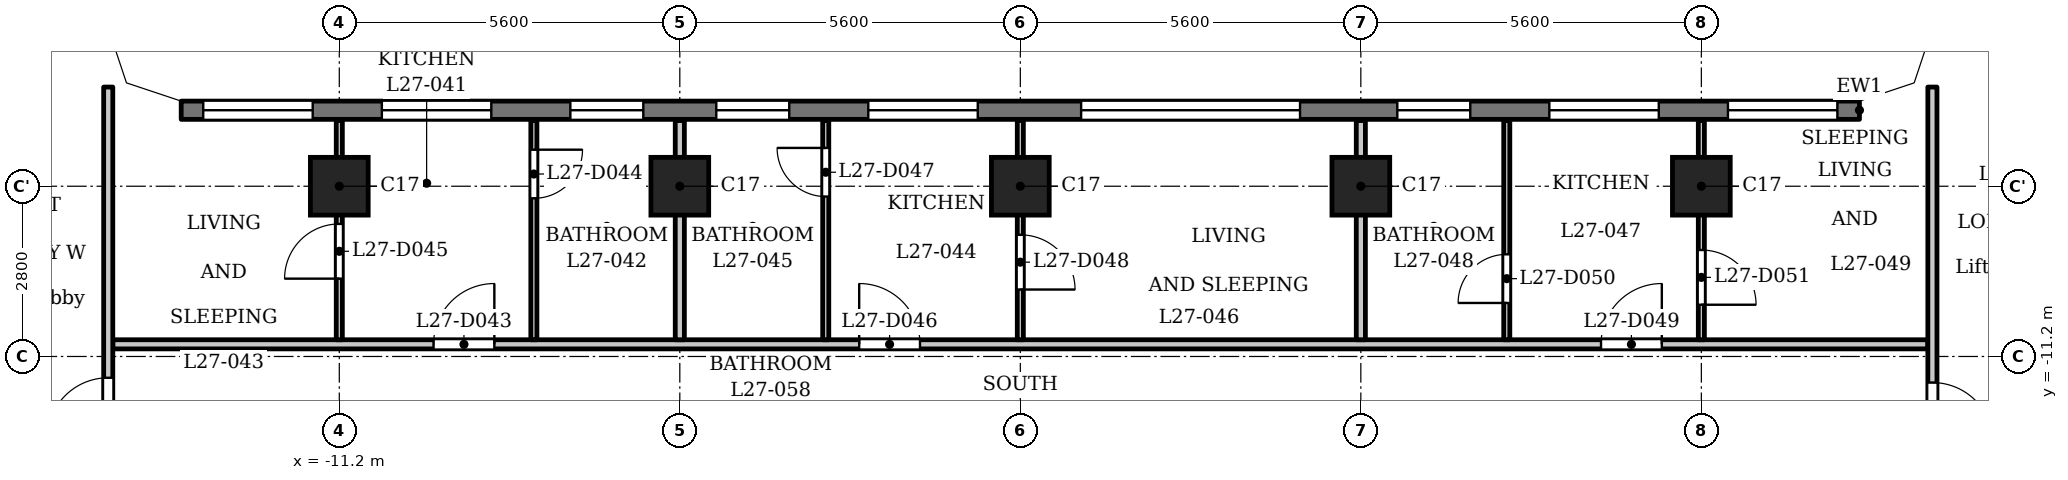
"""IFC4 building model, lengths in metres.
Left out: names, types, materials, properties, quantities, classifications, styles, units other than length and angle.
Written with IfcOpenShell. Run it as: python <this file> out.ifc"""

import sys

from ifc_helpers import new_model, si_unit, direction, frame, frame_2d, origin, origin_2d, place, context, subcontext, project, spatial, polyline, rectangle, outline, extrude, element, fill, save


model = new_model("IFC4")
c1 = context("Model", 3, precision=1e-05, world=origin(), true_north=direction((0.0, 1.0)))
c2 = subcontext(c1, "Body", "Model", "MODEL_VIEW")
j1 = project(units=[si_unit("LENGTHUNIT", "METRE"), si_unit("PLANEANGLEUNIT", "RADIAN")], contexts=[c1])
p1 = place(None, origin())
s1 = spatial("IfcSite", under=j1, at=p1, CompositionType="ELEMENT")
p2 = place(p1, origin())
s2 = spatial("IfcBuilding", under=s1, at=p2, CompositionType="ELEMENT")
p3 = place(p2, frame((0.0, 0.0, 107.8)))
s3 = spatial("IfcBuildingStorey", under=s2, at=p3, CompositionType="ELEMENT", Elevation=107.8)
for number, where, z_axis, x_axis in (
    (1, (-11.2, -8.4, 0.0), (0.0, 0.0, 1.0), (1.0, 0.0, 0.0)),
    (2, (-5.6, -8.4, 0.0), (0.0, 0.0, 1.0), (1.0, 0.0, 0.0)),
    (3, (0.0, -8.4, 0.0), (0.0, 0.0, 1.0), (1.0, 0.0, 0.0)),
    (4, (5.6, -8.4, 0.0), (0.0, 0.0, 1.0), (1.0, 0.0, 0.0)),
    (5, (11.2, -8.4, 0.0), (0.0, 0.0, 1.0), (1.0, 0.0, 0.0)),
):
    element("IfcColumn", number, at=place(p3, frame(where, z_axis=z_axis, x_axis=x_axis)), inside=s3, PredefinedType="COLUMN", context=c2, shape_type="SweptSolid", body=[
        extrude(rectangle(XDim=0.95, YDim=0.95, at=origin_2d()), origin(), (0.0, 0.0, 1.0), 3.5),
    ])
p4 = place(p3, frame((13.8, -7.15, 0.0), z_axis=(0.0, 0.0, 1.0), x_axis=(-1.0, 0.0, 0.0)))
e6 = element("IfcWall", 6, at=p4, inside=s3, PredefinedType="SOLIDWALL", context=c2, shape_type="SweptSolid", body=[
    extrude(rectangle(XDim=27.6, YDim=0.3, at=frame_2d((13.8, 0.0))), origin(), (0.0, 0.0, 1.0), 3.2),
])
p5 = place(p4, frame((0.363, 0.0, 0.9)))
e7 = element("IfcOpeningElement", 7, at=p5, cuts=e6, PredefinedType="OPENING", context=c2, shape_type="SweptSolid", body=[
    extrude(rectangle(XDim=1.8, YDim=1.25, at=frame_2d((0.9, 0.625))), frame((0.0, 0.16, 0.0), z_axis=(0.0, -1.0, 0.0), x_axis=(1.0, 0.0, 0.0)), (0.0, 0.0, 1.0), 0.32),
])
p6 = place(p4, frame((3.3, 0.0, 0.9)))
e8 = element("IfcOpeningElement", 8, at=p6, cuts=e6, PredefinedType="OPENING", context=c2, shape_type="SweptSolid", body=[
    extrude(rectangle(XDim=1.8, YDim=1.25, at=frame_2d((0.9, 0.625))), frame((0.0, 0.16, 0.0), z_axis=(0.0, -1.0, 0.0), x_axis=(1.0, 0.0, 0.0)), (0.0, 0.0, 1.0), 0.32),
])
p7 = place(p4, frame((6.4, 0.0, 0.6)))
e9 = element("IfcOpeningElement", 9, at=p7, cuts=e6, PredefinedType="OPENING", context=c2, shape_type="SweptSolid", body=[
    extrude(rectangle(XDim=1.2, YDim=1.55, at=frame_2d((0.6, 0.775))), frame((0.0, 0.16, 0.0), z_axis=(0.0, -1.0, 0.0), x_axis=(1.0, 0.0, 0.0)), (0.0, 0.0, 1.0), 0.32),
])
p8 = place(p4, frame((9.2, 0.0, 1.2)))
e10 = element("IfcOpeningElement", 10, at=p8, cuts=e6, PredefinedType="OPENING", context=c2, shape_type="SweptSolid", body=[
    extrude(rectangle(XDim=3.6, YDim=0.95, at=frame_2d((1.8, 0.475))), frame((0.0, 0.16, 0.0), z_axis=(0.0, -1.0, 0.0), x_axis=(1.0, 0.0, 0.0)), (0.0, 0.0, 1.0), 0.32),
])
p9 = place(p4, frame((14.5, 0.0, 0.9)))
e11 = element("IfcOpeningElement", 11, at=p9, cuts=e6, PredefinedType="OPENING", context=c2, shape_type="SweptSolid", body=[
    extrude(rectangle(XDim=1.8, YDim=1.25, at=frame_2d((0.9, 0.625))), frame((0.0, 0.16, 0.0), z_axis=(0.0, -1.0, 0.0), x_axis=(1.0, 0.0, 0.0)), (0.0, 0.0, 1.0), 0.32),
])
p10 = place(p4, frame((17.6, 0.0, 0.6)))
e12 = element("IfcOpeningElement", 12, at=p10, cuts=e6, PredefinedType="OPENING", context=c2, shape_type="SweptSolid", body=[
    extrude(rectangle(XDim=1.2, YDim=1.55, at=frame_2d((0.6, 0.775))), frame((0.0, 0.16, 0.0), z_axis=(0.0, -1.0, 0.0), x_axis=(1.0, 0.0, 0.0)), (0.0, 0.0, 1.0), 0.32),
])
p11 = place(p4, frame((20.0, 0.0, 0.6)))
e13 = element("IfcOpeningElement", 13, at=p11, cuts=e6, PredefinedType="OPENING", context=c2, shape_type="SweptSolid", body=[
    extrude(rectangle(XDim=1.2, YDim=1.55, at=frame_2d((0.6, 0.775))), frame((0.0, 0.16, 0.0), z_axis=(0.0, -1.0, 0.0), x_axis=(1.0, 0.0, 0.0)), (0.0, 0.0, 1.0), 0.32),
])
p12 = place(p4, frame((22.5, 0.0, 0.9)))
e14 = element("IfcOpeningElement", 14, at=p12, cuts=e6, PredefinedType="OPENING", context=c2, shape_type="SweptSolid", body=[
    extrude(rectangle(XDim=1.8, YDim=1.25, at=frame_2d((0.9, 0.625))), frame((0.0, 0.16, 0.0), z_axis=(0.0, -1.0, 0.0), x_axis=(1.0, 0.0, 0.0)), (0.0, 0.0, 1.0), 0.32),
])
p13 = place(p4, frame((25.438, 0.0, 0.9)))
e15 = element("IfcOpeningElement", 15, at=p13, cuts=e6, PredefinedType="OPENING", context=c2, shape_type="SweptSolid", body=[
    extrude(rectangle(XDim=1.8, YDim=1.25, at=frame_2d((0.9, 0.625))), frame((0.0, 0.16, 0.0), z_axis=(0.0, -1.0, 0.0), x_axis=(1.0, 0.0, 0.0)), (0.0, 0.0, 1.0), 0.32),
])
p14 = place(p3, frame((-14.925, -11.0, 0.0), z_axis=(0.0, 0.0, 1.0), x_axis=(1.0, 0.0, 0.0)))
e16 = element("IfcWall", 16, at=p14, inside=s3, PredefinedType="PARTITIONING", context=c2, shape_type="SweptSolid", body=[
    extrude(rectangle(XDim=29.85, YDim=0.15, at=frame_2d((14.925, 0.0))), origin(), (0.0, 0.0, 1.0), 3.2),
])
p15 = place(p14, frame((5.275, 0.0, 0.0)))
e17 = element("IfcOpeningElement", 17, at=p15, cuts=e16, PredefinedType="OPENING", context=c2, shape_type="SweptSolid", body=[
    extrude(rectangle(XDim=1.0, YDim=2.1, at=frame_2d((0.5, 1.05))), frame((0.0, 0.085, 0.0), z_axis=(0.0, -1.0, 0.0), x_axis=(1.0, 0.0, 0.0)), (0.0, 0.0, 1.0), 0.17),
])
p16 = place(p14, frame((12.275, 0.0, 0.0)))
e18 = element("IfcOpeningElement", 18, at=p16, cuts=e16, PredefinedType="OPENING", context=c2, shape_type="SweptSolid", body=[
    extrude(rectangle(XDim=1.0, YDim=2.1, at=frame_2d((0.5, 1.05))), frame((0.0, 0.085, 0.0), z_axis=(0.0, -1.0, 0.0), x_axis=(1.0, 0.0, 0.0)), (0.0, 0.0, 1.0), 0.17),
])
p17 = place(p14, frame((24.475, 0.0, 0.0)))
e19 = element("IfcOpeningElement", 19, at=p17, cuts=e16, PredefinedType="OPENING", context=c2, shape_type="SweptSolid", body=[
    extrude(rectangle(XDim=1.0, YDim=2.1, at=frame_2d((0.5, 1.05))), frame((0.0, 0.085, 0.0), z_axis=(0.0, -1.0, 0.0), x_axis=(1.0, 0.0, 0.0)), (0.0, 0.0, 1.0), 0.17),
])
p18 = place(p3, frame((-15.0, -13.125, 0.0), z_axis=(0.0, 0.0, 1.0), x_axis=(0.0, 1.0, 0.0)))
e20 = element("IfcWall", 20, at=p18, inside=s3, PredefinedType="PARTITIONING", context=c2, shape_type="SweptSolid", body=[
    extrude(rectangle(XDim=6.356, YDim=0.15, at=frame_2d((3.178, 0.0))), origin(), (0.0, 0.0, 1.0), 3.2),
])
p19 = place(p18, frame((0.575, 0.0, 0.0)))
e21 = element("IfcOpeningElement", 21, at=p19, cuts=e20, PredefinedType="OPENING", context=c2, shape_type="SweptSolid", body=[
    extrude(rectangle(XDim=1.0, YDim=2.1, at=frame_2d((0.5, 1.05))), frame((0.0, 0.085, 0.0), z_axis=(0.0, -1.0, 0.0), x_axis=(1.0, 0.0, 0.0)), (0.0, 0.0, 1.0), 0.17),
])
p20 = place(p3, frame((-11.2, -10.925, 0.0), z_axis=(0.0, 0.0, 1.0), x_axis=(0.0, 1.0, 0.0)))
e22 = element("IfcWall", 22, at=p20, inside=s3, PredefinedType="PARTITIONING", context=c2, shape_type="SweptSolid", body=[
    extrude(rectangle(XDim=3.605, YDim=0.1, at=frame_2d((1.802, 0.0))), origin(), (0.0, 0.0, 1.0), 3.2),
])
p21 = place(p20, frame((1.005, 0.0, 0.0)))
e23 = element("IfcOpeningElement", 23, at=p21, cuts=e22, PredefinedType="OPENING", context=c2, shape_type="SweptSolid", body=[
    extrude(rectangle(XDim=0.9, YDim=2.1, at=frame_2d((0.45, 1.05))), frame((0.0, 0.06, 0.0), z_axis=(0.0, -1.0, 0.0), x_axis=(1.0, 0.0, 0.0)), (0.0, 0.0, 1.0), 0.12),
])
p22 = place(p3, frame((-8.0, -10.925, 0.0), z_axis=(0.0, 0.0, 1.0), x_axis=(0.0, 1.0, 0.0)))
e24 = element("IfcWall", 24, at=p22, inside=s3, PredefinedType="PARTITIONING", context=c2, shape_type="SweptSolid", body=[
    extrude(rectangle(XDim=3.605, YDim=0.1, at=frame_2d((1.802, 0.0))), origin(), (0.0, 0.0, 1.0), 3.2),
])
p23 = place(p22, frame((2.326, 0.0, 0.0)))
e25 = element("IfcOpeningElement", 25, at=p23, cuts=e24, PredefinedType="OPENING", context=c2, shape_type="SweptSolid", body=[
    extrude(rectangle(XDim=0.8, YDim=2.1, at=frame_2d((0.4, 1.05))), frame((0.0, 0.06, 0.0), z_axis=(0.0, -1.0, 0.0), x_axis=(1.0, 0.0, 0.0)), (0.0, 0.0, 1.0), 0.12),
])
p24 = place(p3, frame((-5.6, -10.925, 0.0), z_axis=(0.0, 0.0, 1.0), x_axis=(0.0, 1.0, 0.0)))
e26 = element("IfcWall", 26, at=p24, inside=s3, PredefinedType="PARTITIONING", context=c2, shape_type="SweptSolid", body=[
    extrude(rectangle(XDim=3.605, YDim=0.15, at=frame_2d((1.802, 0.0))), origin(), (0.0, 0.0, 1.0), 3.2),
])
p25 = place(p3, frame((-3.2, -10.925, 0.0), z_axis=(0.0, 0.0, 1.0), x_axis=(0.0, 1.0, 0.0)))
e27 = element("IfcWall", 27, at=p25, inside=s3, PredefinedType="PARTITIONING", context=c2, shape_type="SweptSolid", body=[
    extrude(rectangle(XDim=3.605, YDim=0.1, at=frame_2d((1.802, 0.0))), origin(), (0.0, 0.0, 1.0), 3.2),
])
p26 = place(p25, frame((2.355, 0.0, 0.0)))
e28 = element("IfcOpeningElement", 28, at=p26, cuts=e27, PredefinedType="OPENING", context=c2, shape_type="SweptSolid", body=[
    extrude(rectangle(XDim=0.8, YDim=2.1, at=frame_2d((0.4, 1.05))), frame((0.0, 0.06, 0.0), z_axis=(0.0, -1.0, 0.0), x_axis=(1.0, 0.0, 0.0)), (0.0, 0.0, 1.0), 0.12),
])
p27 = place(p3, frame((0.0, -10.925, 0.0), z_axis=(0.0, 0.0, 1.0), x_axis=(0.0, 1.0, 0.0)))
e29 = element("IfcWall", 29, at=p27, inside=s3, PredefinedType="PARTITIONING", context=c2, shape_type="SweptSolid", body=[
    extrude(rectangle(XDim=3.605, YDim=0.1, at=frame_2d((1.802, 0.0))), origin(), (0.0, 0.0, 1.0), 3.2),
])
p28 = place(p27, frame((0.826, 0.0, 0.0)))
e30 = element("IfcOpeningElement", 30, at=p28, cuts=e29, PredefinedType="OPENING", context=c2, shape_type="SweptSolid", body=[
    extrude(rectangle(XDim=0.9, YDim=2.1, at=frame_2d((0.45, 1.05))), frame((0.0, 0.06, 0.0), z_axis=(0.0, -1.0, 0.0), x_axis=(1.0, 0.0, 0.0)), (0.0, 0.0, 1.0), 0.12),
])
p29 = place(p3, frame((5.6, -10.925, 0.0), z_axis=(0.0, 0.0, 1.0), x_axis=(0.0, 1.0, 0.0)))
e31 = element("IfcWall", 31, at=p29, inside=s3, PredefinedType="PARTITIONING", context=c2, shape_type="SweptSolid", body=[
    extrude(rectangle(XDim=3.605, YDim=0.15, at=frame_2d((1.802, 0.0))), origin(), (0.0, 0.0, 1.0), 3.2),
])
p30 = place(p3, frame((8.0, -10.925, 0.0), z_axis=(0.0, 0.0, 1.0), x_axis=(0.0, 1.0, 0.0)))
e32 = element("IfcWall", 32, at=p30, inside=s3, PredefinedType="PARTITIONING", context=c2, shape_type="SweptSolid", body=[
    extrude(rectangle(XDim=3.605, YDim=0.1, at=frame_2d((1.802, 0.0))), origin(), (0.0, 0.0, 1.0), 3.2),
])
p31 = place(p30, frame((0.605, 0.0, 0.0)))
e33 = element("IfcOpeningElement", 33, at=p31, cuts=e32, PredefinedType="OPENING", context=c2, shape_type="SweptSolid", body=[
    extrude(rectangle(XDim=0.8, YDim=2.1, at=frame_2d((0.4, 1.05))), frame((0.0, 0.06, 0.0), z_axis=(0.0, -1.0, 0.0), x_axis=(1.0, 0.0, 0.0)), (0.0, 0.0, 1.0), 0.12),
])
p32 = place(p3, frame((11.2, -10.925, 0.0), z_axis=(0.0, 0.0, 1.0), x_axis=(0.0, 1.0, 0.0)))
e34 = element("IfcWall", 34, at=p32, inside=s3, PredefinedType="PARTITIONING", context=c2, shape_type="SweptSolid", body=[
    extrude(rectangle(XDim=3.605, YDim=0.1, at=frame_2d((1.802, 0.0))), origin(), (0.0, 0.0, 1.0), 3.2),
])
p33 = place(p32, frame((0.576, 0.0, 0.0)))
e35 = element("IfcOpeningElement", 35, at=p33, cuts=e34, PredefinedType="OPENING", context=c2, shape_type="SweptSolid", body=[
    extrude(rectangle(XDim=0.9, YDim=2.1, at=frame_2d((0.45, 1.05))), frame((0.0, 0.06, 0.0), z_axis=(0.0, -1.0, 0.0), x_axis=(1.0, 0.0, 0.0)), (0.0, 0.0, 1.0), 0.12),
])
p34 = place(p3, frame((15.0, -13.125, 0.0), z_axis=(0.0, 0.0, 1.0), x_axis=(0.0, 1.0, 0.0)))
e36 = element("IfcWall", 36, at=p34, inside=s3, PredefinedType="PARTITIONING", context=c2, shape_type="SweptSolid", body=[
    extrude(rectangle(XDim=6.356, YDim=0.15, at=frame_2d((3.178, 0.0))), origin(), (0.0, 0.0, 1.0), 3.2),
])
p35 = place(p34, frame((0.496, 0.0, 0.0)))
e37 = element("IfcOpeningElement", 37, at=p35, cuts=e36, PredefinedType="OPENING", context=c2, shape_type="SweptSolid", body=[
    extrude(rectangle(XDim=1.0, YDim=2.1, at=frame_2d((0.5, 1.05))), frame((0.0, 0.085, 0.0), z_axis=(0.0, -1.0, 0.0), x_axis=(1.0, 0.0, 0.0)), (0.0, 0.0, 1.0), 0.17),
])
p36 = place(p3, origin())
e38 = element("IfcWall", 38, at=p36, inside=s3, PredefinedType="SOLIDWALL", context=c2, shape_type="SweptSolid", body=[
    extrude(outline(polyline([(14.937, -6.937), (15.3, -5.849), (15.3, -5.8), (15.0, -5.8), (14.7, -6.7), (13.8, -7.0), (13.8, -7.3), (13.849, -7.3), (14.937, -6.937)])), origin(), (0.0, 0.0, 1.0), 3.2),
])
e39 = element("IfcWall", 39, at=p36, inside=s3, PredefinedType="SOLIDWALL", context=c2, shape_type="SweptSolid", body=[
    extrude(outline(polyline([(-14.937, -6.937), (-13.849, -7.3), (-13.8, -7.3), (-13.8, -7.0), (-14.7, -6.7), (-15.0, -5.8), (-15.3, -5.8), (-15.3, -5.849), (-14.937, -6.937)])), origin(), (0.0, 0.0, 1.0), 3.2),
])
p37 = place(p19, origin())
e40 = element("IfcDoor", 40, at=p37, inside=s3, OperationType="SINGLE_SWING_RIGHT", PredefinedType="DOOR", context=c2, shape_type="SweptSolid", body=[
    extrude(rectangle(XDim=1.0, YDim=2.1, at=frame_2d((0.5, 1.05))), frame((0.0, 0.025, 0.0), z_axis=(0.0, -1.0, 0.0), x_axis=(1.0, 0.0, 0.0)), (0.0, 0.0, 1.0), 0.05),
])
fill(e21, e40)
p38 = place(p35, origin())
e41 = element("IfcDoor", 41, at=p38, inside=s3, OperationType="SINGLE_SWING_LEFT", PredefinedType="DOOR", context=c2, shape_type="SweptSolid", body=[
    extrude(rectangle(XDim=1.0, YDim=2.1, at=frame_2d((0.5, 1.05))), frame((0.0, 0.025, 0.0), z_axis=(0.0, -1.0, 0.0), x_axis=(1.0, 0.0, 0.0)), (0.0, 0.0, 1.0), 0.05),
])
fill(e37, e41)
p39 = place(p15, origin())
e42 = element("IfcDoor", 42, at=p39, inside=s3, OperationType="SINGLE_SWING_LEFT", PredefinedType="DOOR", context=c2, shape_type="SweptSolid", body=[
    extrude(rectangle(XDim=1.0, YDim=2.1, at=frame_2d((0.5, 1.05))), frame((0.0, 0.025, 0.0), z_axis=(0.0, -1.0, 0.0), x_axis=(1.0, 0.0, 0.0)), (0.0, 0.0, 1.0), 0.05),
])
fill(e17, e42)
p40 = place(p23, origin())
e43 = element("IfcDoor", 43, at=p40, inside=s3, OperationType="SINGLE_SWING_RIGHT", PredefinedType="DOOR", context=c2, shape_type="SweptSolid", body=[
    extrude(rectangle(XDim=0.8, YDim=2.1, at=frame_2d((0.4, 1.05))), frame((0.0, 0.025, 0.0), z_axis=(0.0, -1.0, 0.0), x_axis=(1.0, 0.0, 0.0)), (0.0, 0.0, 1.0), 0.05),
])
fill(e25, e43)
p41 = place(p21, origin())
e44 = element("IfcDoor", 44, at=p41, inside=s3, OperationType="SINGLE_SWING_RIGHT", PredefinedType="DOOR", context=c2, shape_type="SweptSolid", body=[
    extrude(rectangle(XDim=0.9, YDim=2.1, at=frame_2d((0.45, 1.05))), frame((0.0, 0.025, 0.0), z_axis=(0.0, -1.0, 0.0), x_axis=(1.0, 0.0, 0.0)), (0.0, 0.0, 1.0), 0.05),
])
fill(e23, e44)
p42 = place(p16, origin())
e45 = element("IfcDoor", 45, at=p42, inside=s3, OperationType="SINGLE_SWING_RIGHT", PredefinedType="DOOR", context=c2, shape_type="SweptSolid", body=[
    extrude(rectangle(XDim=1.0, YDim=2.1, at=frame_2d((0.5, 1.05))), frame((0.0, 0.025, 0.0), z_axis=(0.0, -1.0, 0.0), x_axis=(1.0, 0.0, 0.0)), (0.0, 0.0, 1.0), 0.05),
])
fill(e18, e45)
p43 = place(p26, origin())
e46 = element("IfcDoor", 46, at=p43, inside=s3, OperationType="SINGLE_SWING_LEFT", PredefinedType="DOOR", context=c2, shape_type="SweptSolid", body=[
    extrude(rectangle(XDim=0.8, YDim=2.1, at=frame_2d((0.4, 1.05))), frame((0.0, 0.025, 0.0), z_axis=(0.0, -1.0, 0.0), x_axis=(1.0, 0.0, 0.0)), (0.0, 0.0, 1.0), 0.05),
])
fill(e28, e46)
p44 = place(p28, origin())
e47 = element("IfcDoor", 47, at=p44, inside=s3, OperationType="SINGLE_SWING_LEFT", PredefinedType="DOOR", context=c2, shape_type="SweptSolid", body=[
    extrude(rectangle(XDim=0.9, YDim=2.1, at=frame_2d((0.45, 1.05))), frame((0.0, 0.025, 0.0), z_axis=(0.0, -1.0, 0.0), x_axis=(1.0, 0.0, 0.0)), (0.0, 0.0, 1.0), 0.05),
])
fill(e30, e47)
p45 = place(p17, origin())
e48 = element("IfcDoor", 48, at=p45, inside=s3, OperationType="SINGLE_SWING_LEFT", PredefinedType="DOOR", context=c2, shape_type="SweptSolid", body=[
    extrude(rectangle(XDim=1.0, YDim=2.1, at=frame_2d((0.5, 1.05))), frame((0.0, 0.025, 0.0), z_axis=(0.0, -1.0, 0.0), x_axis=(1.0, 0.0, 0.0)), (0.0, 0.0, 1.0), 0.05),
])
fill(e19, e48)
p46 = place(p31, origin())
e49 = element("IfcDoor", 49, at=p46, inside=s3, OperationType="SINGLE_SWING_RIGHT", PredefinedType="DOOR", context=c2, shape_type="SweptSolid", body=[
    extrude(rectangle(XDim=0.8, YDim=2.1, at=frame_2d((0.4, 1.05))), frame((0.0, 0.025, 0.0), z_axis=(0.0, -1.0, 0.0), x_axis=(1.0, 0.0, 0.0)), (0.0, 0.0, 1.0), 0.05),
])
fill(e33, e49)
p47 = place(p33, origin())
e50 = element("IfcDoor", 50, at=p47, inside=s3, OperationType="SINGLE_SWING_LEFT", PredefinedType="DOOR", context=c2, shape_type="SweptSolid", body=[
    extrude(rectangle(XDim=0.9, YDim=2.1, at=frame_2d((0.45, 1.05))), frame((0.0, 0.025, 0.0), z_axis=(0.0, -1.0, 0.0), x_axis=(1.0, 0.0, 0.0)), (0.0, 0.0, 1.0), 0.05),
])
fill(e35, e50)
p48 = place(p5, origin())
e51 = element("IfcWindow", 51, at=p48, inside=s3, PartitioningType="SINGLE_PANEL", PredefinedType="WINDOW", context=c2, shape_type="SweptSolid", body=[
    extrude(rectangle(XDim=1.8, YDim=1.25, at=frame_2d((0.9, 0.625))), frame((0.0, 0.03, 0.0), z_axis=(0.0, -1.0, 0.0), x_axis=(1.0, 0.0, 0.0)), (0.0, 0.0, 1.0), 0.06),
])
fill(e7, e51)
p49 = place(p6, origin())
e52 = element("IfcWindow", 52, at=p49, inside=s3, PartitioningType="SINGLE_PANEL", PredefinedType="WINDOW", context=c2, shape_type="SweptSolid", body=[
    extrude(rectangle(XDim=1.8, YDim=1.25, at=frame_2d((0.9, 0.625))), frame((0.0, 0.03, 0.0), z_axis=(0.0, -1.0, 0.0), x_axis=(1.0, 0.0, 0.0)), (0.0, 0.0, 1.0), 0.06),
])
fill(e8, e52)
p50 = place(p7, origin())
e53 = element("IfcWindow", 53, at=p50, inside=s3, PartitioningType="SINGLE_PANEL", PredefinedType="WINDOW", context=c2, shape_type="SweptSolid", body=[
    extrude(rectangle(XDim=1.2, YDim=1.55, at=frame_2d((0.6, 0.775))), frame((0.0, 0.03, 0.0), z_axis=(0.0, -1.0, 0.0), x_axis=(1.0, 0.0, 0.0)), (0.0, 0.0, 1.0), 0.06),
])
fill(e9, e53)
p51 = place(p8, origin())
e54 = element("IfcWindow", 54, at=p51, inside=s3, PartitioningType="SINGLE_PANEL", PredefinedType="WINDOW", context=c2, shape_type="SweptSolid", body=[
    extrude(rectangle(XDim=3.6, YDim=0.95, at=frame_2d((1.8, 0.475))), frame((0.0, 0.03, 0.0), z_axis=(0.0, -1.0, 0.0), x_axis=(1.0, 0.0, 0.0)), (0.0, 0.0, 1.0), 0.06),
])
fill(e10, e54)
p52 = place(p9, origin())
e55 = element("IfcWindow", 55, at=p52, inside=s3, PartitioningType="SINGLE_PANEL", PredefinedType="WINDOW", context=c2, shape_type="SweptSolid", body=[
    extrude(rectangle(XDim=1.8, YDim=1.25, at=frame_2d((0.9, 0.625))), frame((0.0, 0.03, 0.0), z_axis=(0.0, -1.0, 0.0), x_axis=(1.0, 0.0, 0.0)), (0.0, 0.0, 1.0), 0.06),
])
fill(e11, e55)
p53 = place(p10, origin())
e56 = element("IfcWindow", 56, at=p53, inside=s3, PartitioningType="SINGLE_PANEL", PredefinedType="WINDOW", context=c2, shape_type="SweptSolid", body=[
    extrude(rectangle(XDim=1.2, YDim=1.55, at=frame_2d((0.6, 0.775))), frame((0.0, 0.03, 0.0), z_axis=(0.0, -1.0, 0.0), x_axis=(1.0, 0.0, 0.0)), (0.0, 0.0, 1.0), 0.06),
])
fill(e12, e56)
p54 = place(p11, origin())
e57 = element("IfcWindow", 57, at=p54, inside=s3, PartitioningType="SINGLE_PANEL", PredefinedType="WINDOW", context=c2, shape_type="SweptSolid", body=[
    extrude(rectangle(XDim=1.2, YDim=1.55, at=frame_2d((0.6, 0.775))), frame((0.0, 0.03, 0.0), z_axis=(0.0, -1.0, 0.0), x_axis=(1.0, 0.0, 0.0)), (0.0, 0.0, 1.0), 0.06),
])
fill(e13, e57)
p55 = place(p12, origin())
e58 = element("IfcWindow", 58, at=p55, inside=s3, PartitioningType="SINGLE_PANEL", PredefinedType="WINDOW", context=c2, shape_type="SweptSolid", body=[
    extrude(rectangle(XDim=1.8, YDim=1.25, at=frame_2d((0.9, 0.625))), frame((0.0, 0.03, 0.0), z_axis=(0.0, -1.0, 0.0), x_axis=(1.0, 0.0, 0.0)), (0.0, 0.0, 1.0), 0.06),
])
fill(e14, e58)
p56 = place(p13, origin())
e59 = element("IfcWindow", 59, at=p56, inside=s3, PartitioningType="SINGLE_PANEL", PredefinedType="WINDOW", context=c2, shape_type="SweptSolid", body=[
    extrude(rectangle(XDim=1.8, YDim=1.25, at=frame_2d((0.9, 0.625))), frame((0.0, 0.03, 0.0), z_axis=(0.0, -1.0, 0.0), x_axis=(1.0, 0.0, 0.0)), (0.0, 0.0, 1.0), 0.06),
])
fill(e15, e59)
save(model, sys.argv[1])
